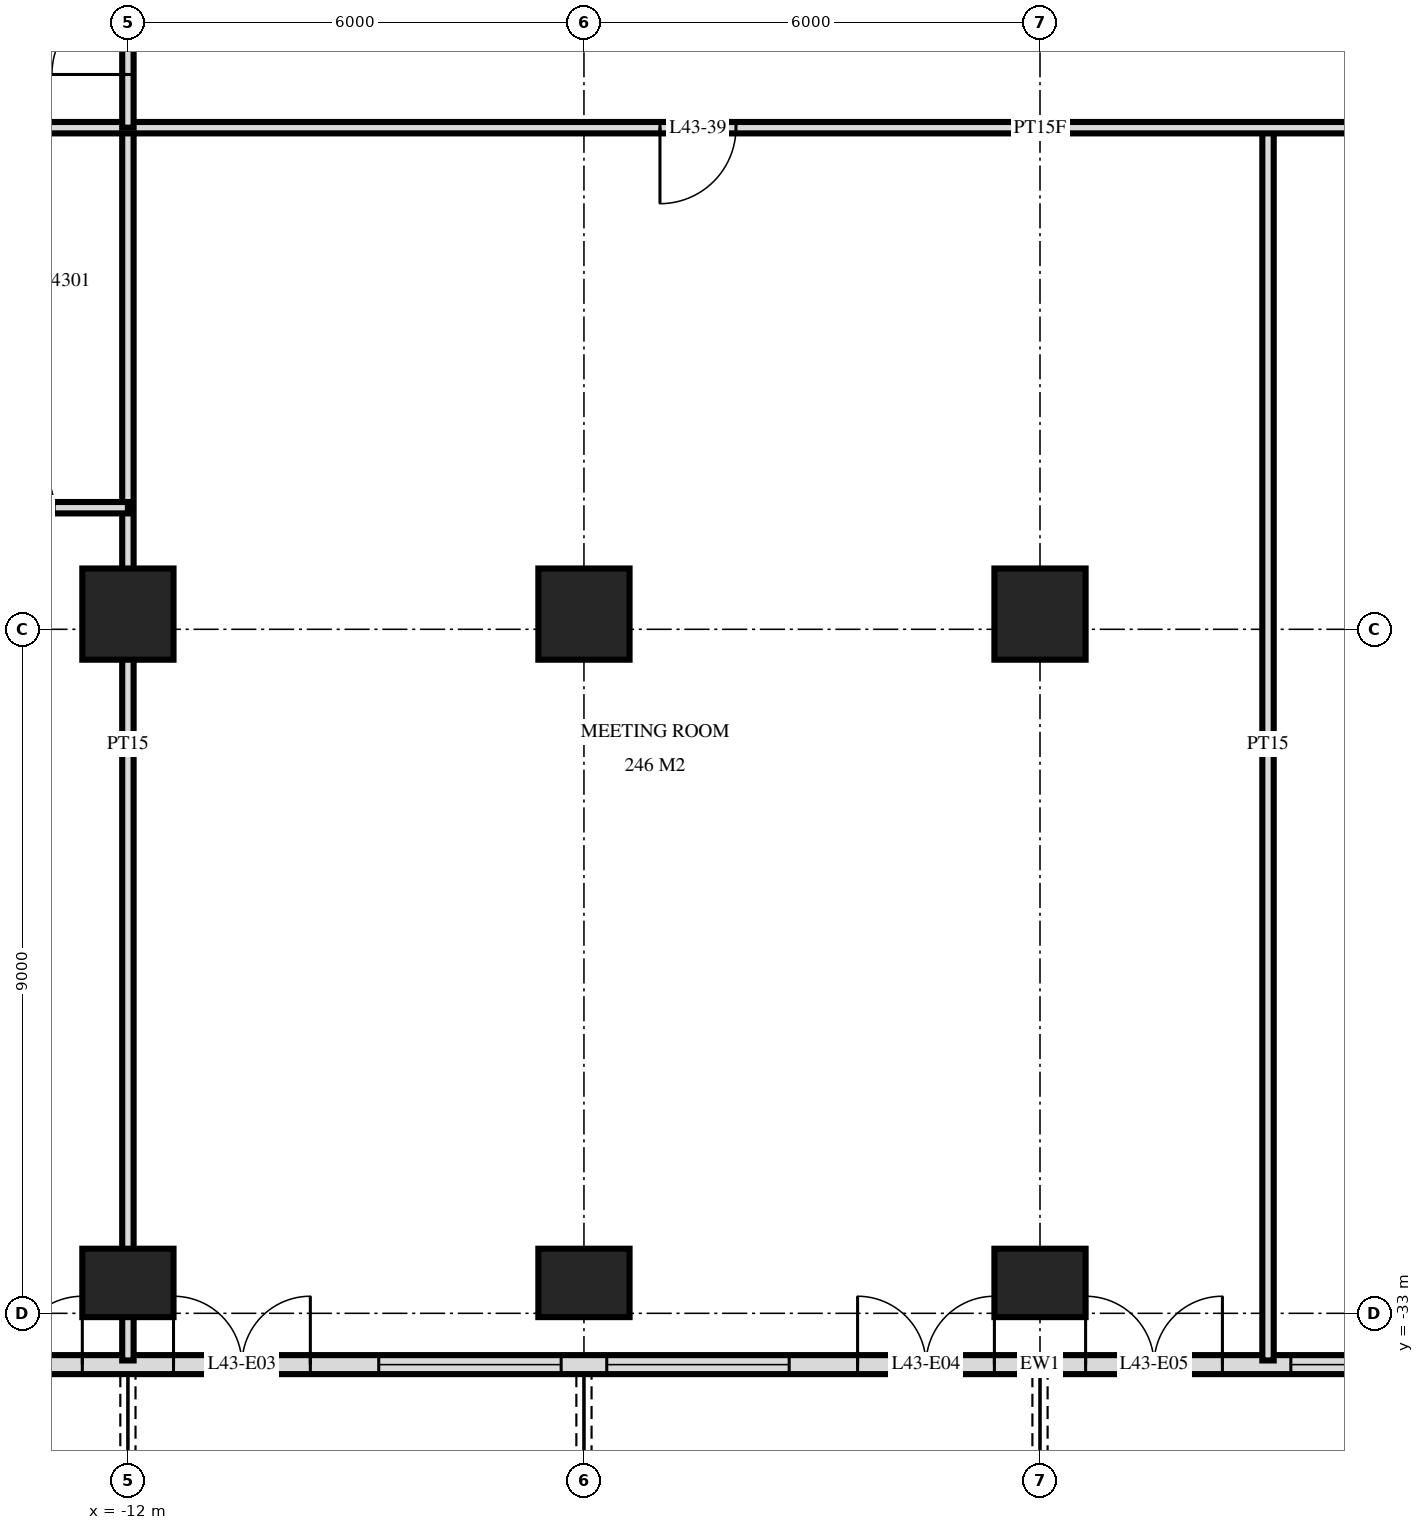
"""IFC4 building model, lengths in metres.
Left out: names, types, materials, properties, quantities, classifications, styles, units other than length and angle.
Written with IfcOpenShell. Run it as: python <this file> out.ifc"""

import sys

from ifc_helpers import new_model, si_unit, direction, frame, frame_2d, origin, origin_2d, place, context, subcontext, project, spatial, rectangle, extrude, element, fill, save


model = new_model("IFC4")
c1 = context("Model", 3, precision=1e-05, world=origin(), true_north=direction((0.0, 1.0)))
c2 = subcontext(c1, "Body", "Model", "MODEL_VIEW")
j1 = project(units=[si_unit("LENGTHUNIT", "METRE"), si_unit("PLANEANGLEUNIT", "RADIAN")], contexts=[c1])
p1 = place(None, origin())
s1 = spatial("IfcSite", under=j1, at=p1, CompositionType="ELEMENT")
p2 = place(p1, origin())
s2 = spatial("IfcBuilding", under=s1, at=p2, CompositionType="ELEMENT")
p3 = place(p2, frame((0.0, 0.0, 166.8)))
s3 = spatial("IfcBuildingStorey", under=s2, at=p3, CompositionType="ELEMENT", Elevation=166.8)
p4 = place(p3, frame((-12.0, -32.6, 0.0), z_axis=(0.0, 0.0, 1.0), x_axis=(1.0, 0.0, 0.0)))
e1 = element("IfcColumn", 1, at=p4, inside=s3, PredefinedType="COLUMN", context=c2, shape_type="SweptSolid", body=[
    extrude(rectangle(XDim=1.2, YDim=0.9, at=origin_2d()), origin(), (0.0, 0.0, 1.0), 3.6),
])
p5 = place(p3, frame((-12.0, -23.8, 0.0), z_axis=(0.0, 0.0, 1.0), x_axis=(1.0, 0.0, 0.0)))
e2 = element("IfcColumn", 2, at=p5, inside=s3, PredefinedType="COLUMN", context=c2, shape_type="SweptSolid", body=[
    extrude(rectangle(XDim=1.2, YDim=1.2, at=origin_2d()), origin(), (0.0, 0.0, 1.0), 3.6),
])
p6 = place(p3, frame((-6.0, -32.6, 0.0), z_axis=(0.0, 0.0, 1.0), x_axis=(1.0, 0.0, 0.0)))
e3 = element("IfcColumn", 3, at=p6, inside=s3, PredefinedType="COLUMN", context=c2, shape_type="SweptSolid", body=[
    extrude(rectangle(XDim=1.2, YDim=0.9, at=origin_2d()), origin(), (0.0, 0.0, 1.0), 3.6),
])
p7 = place(p3, frame((-6.0, -23.8, 0.0), z_axis=(0.0, 0.0, 1.0), x_axis=(1.0, 0.0, 0.0)))
e4 = element("IfcColumn", 4, at=p7, inside=s3, PredefinedType="COLUMN", context=c2, shape_type="SweptSolid", body=[
    extrude(rectangle(XDim=1.2, YDim=1.2, at=origin_2d()), origin(), (0.0, 0.0, 1.0), 3.6),
])
p8 = place(p3, frame((0.0, -32.6, 0.0), z_axis=(0.0, 0.0, 1.0), x_axis=(1.0, 0.0, 0.0)))
e5 = element("IfcColumn", 5, at=p8, inside=s3, PredefinedType="COLUMN", context=c2, shape_type="SweptSolid", body=[
    extrude(rectangle(XDim=1.2, YDim=0.9, at=origin_2d()), origin(), (0.0, 0.0, 1.0), 3.6),
])
p9 = place(p3, frame((0.0, -23.8, 0.0), z_axis=(0.0, 0.0, 1.0), x_axis=(1.0, 0.0, 0.0)))
e6 = element("IfcColumn", 6, at=p9, inside=s3, PredefinedType="COLUMN", context=c2, shape_type="SweptSolid", body=[
    extrude(rectangle(XDim=1.2, YDim=1.2, at=origin_2d()), origin(), (0.0, 0.0, 1.0), 3.6),
])
p10 = place(p3, frame((-23.675, -33.675, 0.0), z_axis=(0.0, 0.0, 1.0), x_axis=(1.0, 0.0, 0.0)))
e7 = element("IfcWall", 7, at=p10, inside=s3, PredefinedType="SOLIDWALL", context=c2, shape_type="SweptSolid", body=[
    extrude(rectangle(XDim=47.351, YDim=0.25, at=frame_2d((23.675, 0.0))), origin(), (0.0, 0.0, 1.0), 3.32),
])
p11 = place(p10, frame((0.575, 0.0, 0.0)))
e8 = element("IfcOpeningElement", 8, at=p11, cuts=e7, PredefinedType="OPENING", context=c2, shape_type="SweptSolid", body=[
    extrude(rectangle(XDim=1.8, YDim=2.4, at=frame_2d((0.9, 1.2))), frame((0.0, 0.135, 0.0), z_axis=(0.0, -1.0, 0.0), x_axis=(1.0, 0.0, 0.0)), (0.0, 0.0, 1.0), 0.27),
])
p12 = place(p10, frame((3.425, 0.0, 0.3)))
e9 = element("IfcOpeningElement", 9, at=p12, cuts=e7, PredefinedType="OPENING", context=c2, shape_type="SweptSolid", body=[
    extrude(rectangle(XDim=1.8, YDim=2.1, at=frame_2d((0.9, 1.05))), frame((0.0, 0.135, 0.0), z_axis=(0.0, -1.0, 0.0), x_axis=(1.0, 0.0, 0.0)), (0.0, 0.0, 1.0), 0.27),
])
p13 = place(p10, frame((5.975, 0.0, 0.3)))
e10 = element("IfcOpeningElement", 10, at=p13, cuts=e7, PredefinedType="OPENING", context=c2, shape_type="SweptSolid", body=[
    extrude(rectangle(XDim=2.4, YDim=2.1, at=frame_2d((1.2, 1.05))), frame((0.0, 0.135, 0.0), z_axis=(0.0, -1.0, 0.0), x_axis=(1.0, 0.0, 0.0)), (0.0, 0.0, 1.0), 0.27),
])
p14 = place(p10, frame((9.275, 0.0, 0.0)))
e11 = element("IfcOpeningElement", 11, at=p14, cuts=e7, PredefinedType="OPENING", context=c2, shape_type="SweptSolid", body=[
    extrude(rectangle(XDim=1.8, YDim=2.4, at=frame_2d((0.9, 1.2))), frame((0.0, 0.135, 0.0), z_axis=(0.0, -1.0, 0.0), x_axis=(1.0, 0.0, 0.0)), (0.0, 0.0, 1.0), 0.27),
])
p15 = place(p10, frame((12.275, 0.0, 0.0)))
e12 = element("IfcOpeningElement", 12, at=p15, cuts=e7, PredefinedType="OPENING", context=c2, shape_type="SweptSolid", body=[
    extrude(rectangle(XDim=1.8, YDim=2.4, at=frame_2d((0.9, 1.2))), frame((0.0, 0.135, 0.0), z_axis=(0.0, -1.0, 0.0), x_axis=(1.0, 0.0, 0.0)), (0.0, 0.0, 1.0), 0.27),
])
p16 = place(p10, frame((14.975, 0.0, 0.3)))
e13 = element("IfcOpeningElement", 13, at=p16, cuts=e7, PredefinedType="OPENING", context=c2, shape_type="SweptSolid", body=[
    extrude(rectangle(XDim=2.4, YDim=2.1, at=frame_2d((1.2, 1.05))), frame((0.0, 0.135, 0.0), z_axis=(0.0, -1.0, 0.0), x_axis=(1.0, 0.0, 0.0)), (0.0, 0.0, 1.0), 0.27),
])
p17 = place(p10, frame((17.975, 0.0, 0.3)))
e14 = element("IfcOpeningElement", 14, at=p17, cuts=e7, PredefinedType="OPENING", context=c2, shape_type="SweptSolid", body=[
    extrude(rectangle(XDim=2.4, YDim=2.1, at=frame_2d((1.2, 1.05))), frame((0.0, 0.135, 0.0), z_axis=(0.0, -1.0, 0.0), x_axis=(1.0, 0.0, 0.0)), (0.0, 0.0, 1.0), 0.27),
])
p18 = place(p10, frame((21.275, 0.0, 0.0)))
e15 = element("IfcOpeningElement", 15, at=p18, cuts=e7, PredefinedType="OPENING", context=c2, shape_type="SweptSolid", body=[
    extrude(rectangle(XDim=1.8, YDim=2.4, at=frame_2d((0.9, 1.2))), frame((0.0, 0.135, 0.0), z_axis=(0.0, -1.0, 0.0), x_axis=(1.0, 0.0, 0.0)), (0.0, 0.0, 1.0), 0.27),
])
p19 = place(p10, frame((24.275, 0.0, 0.0)))
e16 = element("IfcOpeningElement", 16, at=p19, cuts=e7, PredefinedType="OPENING", context=c2, shape_type="SweptSolid", body=[
    extrude(rectangle(XDim=1.8, YDim=2.4, at=frame_2d((0.9, 1.2))), frame((0.0, 0.135, 0.0), z_axis=(0.0, -1.0, 0.0), x_axis=(1.0, 0.0, 0.0)), (0.0, 0.0, 1.0), 0.27),
])
p20 = place(p10, frame((26.975, 0.0, 0.3)))
e17 = element("IfcOpeningElement", 17, at=p20, cuts=e7, PredefinedType="OPENING", context=c2, shape_type="SweptSolid", body=[
    extrude(rectangle(XDim=2.4, YDim=2.1, at=frame_2d((1.2, 1.05))), frame((0.0, 0.135, 0.0), z_axis=(0.0, -1.0, 0.0), x_axis=(1.0, 0.0, 0.0)), (0.0, 0.0, 1.0), 0.27),
])
p21 = place(p10, frame((30.275, 0.0, 0.0)))
e18 = element("IfcOpeningElement", 18, at=p21, cuts=e7, PredefinedType="OPENING", context=c2, shape_type="SweptSolid", body=[
    extrude(rectangle(XDim=1.8, YDim=2.4, at=frame_2d((0.9, 1.2))), frame((0.0, 0.135, 0.0), z_axis=(0.0, -1.0, 0.0), x_axis=(1.0, 0.0, 0.0)), (0.0, 0.0, 1.0), 0.27),
])
p22 = place(p10, frame((32.975, 0.0, 0.3)))
e19 = element("IfcOpeningElement", 19, at=p22, cuts=e7, PredefinedType="OPENING", context=c2, shape_type="SweptSolid", body=[
    extrude(rectangle(XDim=2.4, YDim=2.1, at=frame_2d((1.2, 1.05))), frame((0.0, 0.135, 0.0), z_axis=(0.0, -1.0, 0.0), x_axis=(1.0, 0.0, 0.0)), (0.0, 0.0, 1.0), 0.27),
])
p23 = place(p10, frame((35.975, 0.0, 0.3)))
e20 = element("IfcOpeningElement", 20, at=p23, cuts=e7, PredefinedType="OPENING", context=c2, shape_type="SweptSolid", body=[
    extrude(rectangle(XDim=2.4, YDim=2.1, at=frame_2d((1.2, 1.05))), frame((0.0, 0.135, 0.0), z_axis=(0.0, -1.0, 0.0), x_axis=(1.0, 0.0, 0.0)), (0.0, 0.0, 1.0), 0.27),
])
p24 = place(p10, frame((39.275, 0.0, 0.0)))
e21 = element("IfcOpeningElement", 21, at=p24, cuts=e7, PredefinedType="OPENING", context=c2, shape_type="SweptSolid", body=[
    extrude(rectangle(XDim=1.8, YDim=2.4, at=frame_2d((0.9, 1.2))), frame((0.0, 0.135, 0.0), z_axis=(0.0, -1.0, 0.0), x_axis=(1.0, 0.0, 0.0)), (0.0, 0.0, 1.0), 0.27),
])
p25 = place(p10, frame((42.275, 0.0, 0.0)))
e22 = element("IfcOpeningElement", 22, at=p25, cuts=e7, PredefinedType="OPENING", context=c2, shape_type="SweptSolid", body=[
    extrude(rectangle(XDim=1.8, YDim=2.4, at=frame_2d((0.9, 1.2))), frame((0.0, 0.135, 0.0), z_axis=(0.0, -1.0, 0.0), x_axis=(1.0, 0.0, 0.0)), (0.0, 0.0, 1.0), 0.27),
])
p26 = place(p10, frame((45.125, 0.0, 0.3)))
e23 = element("IfcOpeningElement", 23, at=p26, cuts=e7, PredefinedType="OPENING", context=c2, shape_type="SweptSolid", body=[
    extrude(rectangle(XDim=1.8, YDim=2.1, at=frame_2d((0.9, 1.05))), frame((0.0, 0.135, 0.0), z_axis=(0.0, -1.0, 0.0), x_axis=(1.0, 0.0, 0.0)), (0.0, 0.0, 1.0), 0.27),
])
p27 = place(p3, frame((3.0, -33.62, 0.0), z_axis=(0.0, 0.0, 1.0), x_axis=(0.0, 1.0, 0.0)))
e24 = element("IfcWall", 24, at=p27, inside=s3, PredefinedType="PARTITIONING", context=c2, shape_type="SweptSolid", body=[
    extrude(rectangle(XDim=16.22, YDim=0.15, at=frame_2d((8.11, 0.0))), origin(), (0.0, 0.0, 1.0), 3.32),
])
p28 = place(p3, frame((-12.0, -17.4, 0.0), z_axis=(0.0, 0.0, 1.0), x_axis=(0.0, 1.0, 0.0)))
e25 = element("IfcWall", 25, at=p28, inside=s3, PredefinedType="PARTITIONING", context=c2, shape_type="SweptSolid", body=[
    extrude(rectangle(XDim=2.35, YDim=0.15, at=frame_2d((1.175, 0.0))), origin(), (0.0, 0.0, 1.0), 3.32),
])
p29 = place(p28, frame((0.7, 0.0, 0.0)))
e26 = element("IfcOpeningElement", 26, at=p29, cuts=e25, PredefinedType="OPENING", context=c2, shape_type="SweptSolid", body=[
    extrude(rectangle(XDim=1.0, YDim=2.1, at=frame_2d((0.5, 1.05))), frame((0.0, 0.085, 0.0), z_axis=(0.0, -1.0, 0.0), x_axis=(1.0, 0.0, 0.0)), (0.0, 0.0, 1.0), 0.17),
])
p30 = place(p3, frame((-12.0, -33.62, 0.0), z_axis=(0.0, 0.0, 1.0), x_axis=(0.0, 1.0, 0.0)))
e27 = element("IfcWall", 27, at=p30, inside=s3, PredefinedType="PARTITIONING", context=c2, shape_type="SweptSolid", body=[
    extrude(rectangle(XDim=16.22, YDim=0.15, at=frame_2d((8.11, 0.0))), origin(), (0.0, 0.0, 1.0), 3.32),
])
p31 = place(p3, frame((-16.2, -22.4, 0.0), z_axis=(0.0, 0.0, 1.0), x_axis=(1.0, 0.0, 0.0)))
e28 = element("IfcWall", 28, at=p31, inside=s3, PredefinedType="PARTITIONING", context=c2, shape_type="SweptSolid", body=[
    extrude(rectangle(XDim=4.2, YDim=0.15, at=frame_2d((2.1, 0.0))), origin(), (0.0, 0.0, 1.0), 3.32),
])
p32 = place(p31, frame((2.43, 0.0, 0.0)))
e29 = element("IfcOpeningElement", 29, at=p32, cuts=e28, PredefinedType="OPENING", context=c2, shape_type="SweptSolid", body=[
    extrude(rectangle(XDim=0.8, YDim=2.1, at=frame_2d((0.4, 1.05))), frame((0.0, 0.085, 0.0), z_axis=(0.0, -1.0, 0.0), x_axis=(1.0, 0.0, 0.0)), (0.0, 0.0, 1.0), 0.17),
])
p33 = place(p3, frame((-28.02, -17.4, 0.0), z_axis=(0.0, 0.0, 1.0), x_axis=(1.0, 0.0, 0.0)))
e30 = element("IfcWall", 30, at=p33, inside=s3, PredefinedType="PARTITIONING", context=c2, shape_type="SweptSolid", body=[
    extrude(rectangle(XDim=56.04, YDim=0.15, at=frame_2d((28.02, 0.0))), origin(), (0.0, 0.0, 1.0), 3.32),
])
p34 = place(p33, frame((10.42, 0.0, 0.0)))
e31 = element("IfcOpeningElement", 31, at=p34, cuts=e30, PredefinedType="OPENING", context=c2, shape_type="SweptSolid", body=[
    extrude(rectangle(XDim=1.0, YDim=2.1, at=frame_2d((0.5, 1.05))), frame((0.0, 0.085, 0.0), z_axis=(0.0, -1.0, 0.0), x_axis=(1.0, 0.0, 0.0)), (0.0, 0.0, 1.0), 0.17),
])
p35 = place(p33, frame((2.32, 0.0, 0.0)))
e32 = element("IfcOpeningElement", 32, at=p35, cuts=e30, PredefinedType="OPENING", context=c2, shape_type="SweptSolid", body=[
    extrude(rectangle(XDim=1.0, YDim=2.1, at=frame_2d((0.5, 1.05))), frame((0.0, 0.085, 0.0), z_axis=(0.0, -1.0, 0.0), x_axis=(1.0, 0.0, 0.0)), (0.0, 0.0, 1.0), 0.17),
])
p36 = place(p33, frame((49.72, 0.0, 0.0)))
e33 = element("IfcOpeningElement", 33, at=p36, cuts=e30, PredefinedType="OPENING", context=c2, shape_type="SweptSolid", body=[
    extrude(rectangle(XDim=1.0, YDim=2.1, at=frame_2d((0.5, 1.05))), frame((0.0, 0.085, 0.0), z_axis=(0.0, -1.0, 0.0), x_axis=(1.0, 0.0, 0.0)), (0.0, 0.0, 1.0), 0.17),
])
p37 = place(p33, frame((23.02, 0.0, 0.0)))
e34 = element("IfcOpeningElement", 34, at=p37, cuts=e30, PredefinedType="OPENING", context=c2, shape_type="SweptSolid", body=[
    extrude(rectangle(XDim=1.0, YDim=2.1, at=frame_2d((0.5, 1.05))), frame((0.0, 0.085, 0.0), z_axis=(0.0, -1.0, 0.0), x_axis=(1.0, 0.0, 0.0)), (0.0, 0.0, 1.0), 0.17),
])
p38 = place(p33, frame((35.02, 0.0, 0.0)))
e35 = element("IfcOpeningElement", 35, at=p38, cuts=e30, PredefinedType="OPENING", context=c2, shape_type="SweptSolid", body=[
    extrude(rectangle(XDim=1.0, YDim=2.1, at=frame_2d((0.5, 1.05))), frame((0.0, 0.085, 0.0), z_axis=(0.0, -1.0, 0.0), x_axis=(1.0, 0.0, 0.0)), (0.0, 0.0, 1.0), 0.17),
])
p39 = place(p14, origin())
e36 = element("IfcDoor", 36, at=p39, inside=s3, OperationType="DOUBLE_DOOR_SINGLE_SWING", PredefinedType="DOOR", context=c2, shape_type="SweptSolid", body=[
    extrude(rectangle(XDim=1.8, YDim=2.4, at=frame_2d((0.9, 1.2))), frame((0.0, 0.025, 0.0), z_axis=(0.0, -1.0, 0.0), x_axis=(1.0, 0.0, 0.0)), (0.0, 0.0, 1.0), 0.05),
])
fill(e11, e36)
p40 = place(p15, origin())
e37 = element("IfcDoor", 37, at=p40, inside=s3, OperationType="DOUBLE_DOOR_SINGLE_SWING", PredefinedType="DOOR", context=c2, shape_type="SweptSolid", body=[
    extrude(rectangle(XDim=1.8, YDim=2.4, at=frame_2d((0.9, 1.2))), frame((0.0, 0.025, 0.0), z_axis=(0.0, -1.0, 0.0), x_axis=(1.0, 0.0, 0.0)), (0.0, 0.0, 1.0), 0.05),
])
fill(e12, e37)
p41 = place(p16, origin())
e38 = element("IfcWindow", 38, at=p41, inside=s3, PartitioningType="SINGLE_PANEL", PredefinedType="WINDOW", context=c2, shape_type="SweptSolid", body=[
    extrude(rectangle(XDim=2.4, YDim=2.1, at=frame_2d((1.2, 1.05))), frame((0.0, 0.03, 0.0), z_axis=(0.0, -1.0, 0.0), x_axis=(1.0, 0.0, 0.0)), (0.0, 0.0, 1.0), 0.06),
])
fill(e13, e38)
p42 = place(p17, origin())
e39 = element("IfcWindow", 39, at=p42, inside=s3, PartitioningType="SINGLE_PANEL", PredefinedType="WINDOW", context=c2, shape_type="SweptSolid", body=[
    extrude(rectangle(XDim=2.4, YDim=2.1, at=frame_2d((1.2, 1.05))), frame((0.0, 0.03, 0.0), z_axis=(0.0, -1.0, 0.0), x_axis=(1.0, 0.0, 0.0)), (0.0, 0.0, 1.0), 0.06),
])
fill(e14, e39)
p43 = place(p18, origin())
e40 = element("IfcDoor", 40, at=p43, inside=s3, OperationType="DOUBLE_DOOR_SINGLE_SWING", PredefinedType="DOOR", context=c2, shape_type="SweptSolid", body=[
    extrude(rectangle(XDim=1.8, YDim=2.4, at=frame_2d((0.9, 1.2))), frame((0.0, 0.025, 0.0), z_axis=(0.0, -1.0, 0.0), x_axis=(1.0, 0.0, 0.0)), (0.0, 0.0, 1.0), 0.05),
])
fill(e15, e40)
p44 = place(p19, origin())
e41 = element("IfcDoor", 41, at=p44, inside=s3, OperationType="DOUBLE_DOOR_SINGLE_SWING", PredefinedType="DOOR", context=c2, shape_type="SweptSolid", body=[
    extrude(rectangle(XDim=1.8, YDim=2.4, at=frame_2d((0.9, 1.2))), frame((0.0, 0.025, 0.0), z_axis=(0.0, -1.0, 0.0), x_axis=(1.0, 0.0, 0.0)), (0.0, 0.0, 1.0), 0.05),
])
fill(e16, e41)
p45 = place(p20, origin())
e42 = element("IfcWindow", 42, at=p45, inside=s3, PartitioningType="SINGLE_PANEL", PredefinedType="WINDOW", context=c2, shape_type="SweptSolid", body=[
    extrude(rectangle(XDim=2.4, YDim=2.1, at=frame_2d((1.2, 1.05))), frame((0.0, 0.03, 0.0), z_axis=(0.0, -1.0, 0.0), x_axis=(1.0, 0.0, 0.0)), (0.0, 0.0, 1.0), 0.06),
])
fill(e17, e42)
p46 = place(p29, origin())
e43 = element("IfcDoor", 43, at=p46, inside=s3, OperationType="SINGLE_SWING_RIGHT", PredefinedType="DOOR", context=c2, shape_type="SweptSolid", body=[
    extrude(rectangle(XDim=1.0, YDim=2.1, at=frame_2d((0.5, 1.05))), frame((0.0, 0.025, 0.0), z_axis=(0.0, -1.0, 0.0), x_axis=(1.0, 0.0, 0.0)), (0.0, 0.0, 1.0), 0.05),
])
fill(e26, e43)
p47 = place(p37, frame((0.5, 0.0, 0.0), z_axis=(0.0, 0.0, 1.0), x_axis=(-1.0, 0.0, 0.0)))
e44 = element("IfcDoor", 44, at=p47, inside=s3, OperationType="SINGLE_SWING_LEFT", PredefinedType="DOOR", context=c2, shape_type="SweptSolid", body=[
    extrude(rectangle(XDim=1.0, YDim=2.1, at=frame_2d((0.0, 1.05))), frame((0.0, -0.025, 0.0), z_axis=(0.0, 1.0, 0.0), x_axis=(-1.0, 0.0, 0.0)), (0.0, 0.0, 1.0), 0.05),
])
fill(e34, e44)
p48 = place(p32, origin())
e45 = element("IfcDoor", 45, at=p48, inside=s3, OperationType="SINGLE_SWING_RIGHT", PredefinedType="DOOR", context=c2, shape_type="SweptSolid", body=[
    extrude(rectangle(XDim=0.8, YDim=2.1, at=frame_2d((0.4, 1.05))), frame((0.0, 0.025, 0.0), z_axis=(0.0, -1.0, 0.0), x_axis=(1.0, 0.0, 0.0)), (0.0, 0.0, 1.0), 0.05),
])
fill(e29, e45)
save(model, sys.argv[1])
